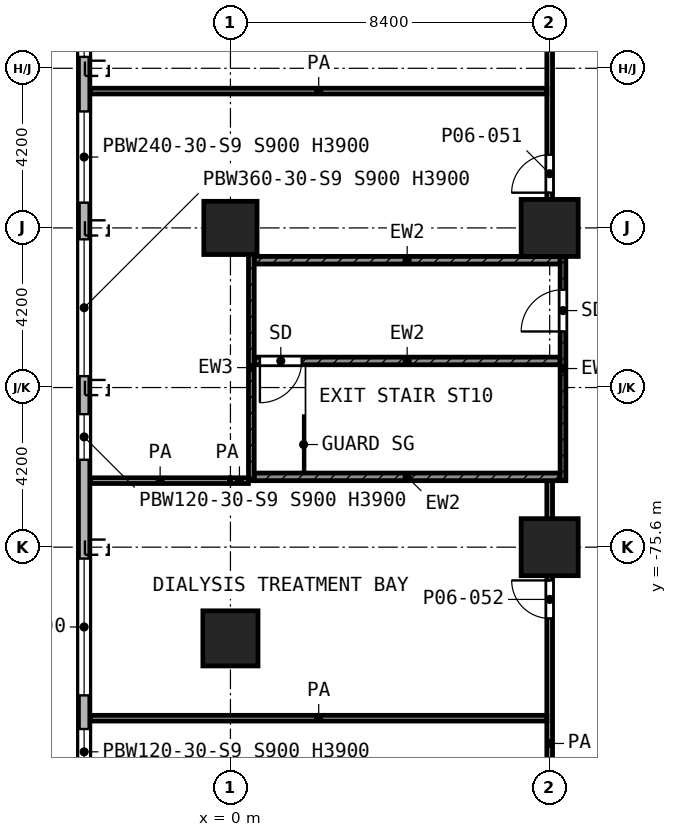
"""IFC4 building model, lengths in metres.
Left out: names, types, materials, properties, quantities, classifications, styles, units other than length and angle.
Written with IfcOpenShell. Run it as: python <this file> out.ifc"""

import sys

from ifc_helpers import new_model, si_unit, direction, frame, frame_2d, origin, origin_2d, place, context, subcontext, project, spatial, rectangle, extrude, element, fill, save


model = new_model("IFC4")
c1 = context("Model", 3, precision=1e-05, world=origin(), true_north=direction((0.0, 1.0)))
c2 = subcontext(c1, "Body", "Model", "MODEL_VIEW")
j1 = project(units=[si_unit("LENGTHUNIT", "METRE"), si_unit("PLANEANGLEUNIT", "RADIAN")], contexts=[c1])
p1 = place(None, origin())
s1 = spatial("IfcSite", under=j1, at=p1, CompositionType="ELEMENT")
p2 = place(p1, origin())
s2 = spatial("IfcBuilding", under=s1, at=p2, CompositionType="ELEMENT")
p3 = place(p2, frame((0.0, 0.0, 29.0)))
s3 = spatial("IfcBuildingStorey", under=s2, at=p3, CompositionType="ELEMENT", Elevation=29.0)
p4 = place(p3, frame((0.0, -67.2, 0.0), z_axis=(0.0, 0.0, 1.0), x_axis=(1.0, 0.0, 0.0)))
e1 = element("IfcColumn", 1, at=p4, inside=s3, PredefinedType="COLUMN", context=c2, shape_type="SweptSolid", body=[
    extrude(rectangle(XDim=1.4, YDim=1.4, at=origin_2d()), origin(), (0.0, 0.0, 1.0), 5.2),
])
for number, where, z_axis, x_axis in (
    (2, (8.4, -67.2, 0.0), (0.0, 0.0, 1.0), (1.0, 0.0, 0.0)),
    (3, (8.4, -75.6, 0.0), (0.0, 0.0, 1.0), (1.0, 0.0, 0.0)),
):
    element("IfcColumn", number, at=place(p3, frame(where, z_axis=z_axis, x_axis=x_axis)), inside=s3, PredefinedType="COLUMN", context=c2, shape_type="SweptSolid", body=[
        extrude(rectangle(XDim=1.5, YDim=1.5, at=origin_2d()), origin(), (0.0, 0.0, 1.0), 5.2),
    ])
p5 = place(p3, frame((0.0, -78.0, 0.0), z_axis=(0.0, 0.0, 1.0), x_axis=(1.0, 0.0, 0.0)))
e4 = element("IfcColumn", 4, at=p5, inside=s3, PredefinedType="COLUMN", context=c2, shape_type="SweptSolid", body=[
    extrude(rectangle(XDim=1.45, YDim=1.45, at=origin_2d()), origin(), (0.0, 0.0, 1.0), 5.2),
])
p6 = place(p3, frame((-3.85, -2.062, 0.0), z_axis=(0.0, 0.0, 1.0), x_axis=(0.0, -1.0, 0.0)))
e5 = element("IfcWall", 5, at=p6, inside=s3, PredefinedType="SOLIDWALL", context=c2, shape_type="SweptSolid", body=[
    extrude(rectangle(XDim=79.876, YDim=0.3, at=frame_2d((39.938, 0.0))), origin(), (0.0, 0.0, 1.0), 4.7),
])
p7 = place(p6, frame((0.438, 0.0, 0.9)))
e6 = element("IfcOpeningElement", 6, at=p7, cuts=e5, PredefinedType="OPENING", context=c2, shape_type="SweptSolid", body=[
    extrude(rectangle(XDim=1.2, YDim=3.0, at=frame_2d((0.6, 1.5))), frame((0.0, 0.16, 0.0), z_axis=(0.0, -1.0, 0.0), x_axis=(1.0, 0.0, 0.0)), (0.0, 0.0, 1.0), 0.32),
])
p8 = place(p6, frame((2.438, 0.0, 0.9)))
e7 = element("IfcOpeningElement", 7, at=p8, cuts=e5, PredefinedType="OPENING", context=c2, shape_type="SweptSolid", body=[
    extrude(rectangle(XDim=3.6, YDim=3.0, at=frame_2d((1.8, 1.5))), frame((0.0, 0.16, 0.0), z_axis=(0.0, -1.0, 0.0), x_axis=(1.0, 0.0, 0.0)), (0.0, 0.0, 1.0), 0.32),
])
p9 = place(p6, frame((6.638, 0.0, 0.9)))
e8 = element("IfcOpeningElement", 8, at=p9, cuts=e5, PredefinedType="OPENING", context=c2, shape_type="SweptSolid", body=[
    extrude(rectangle(XDim=3.6, YDim=3.0, at=frame_2d((1.8, 1.5))), frame((0.0, 0.16, 0.0), z_axis=(0.0, -1.0, 0.0), x_axis=(1.0, 0.0, 0.0)), (0.0, 0.0, 1.0), 0.32),
])
p10 = place(p6, frame((10.838, 0.0, 0.9)))
e9 = element("IfcOpeningElement", 9, at=p10, cuts=e5, PredefinedType="OPENING", context=c2, shape_type="SweptSolid", body=[
    extrude(rectangle(XDim=3.6, YDim=3.0, at=frame_2d((1.8, 1.5))), frame((0.0, 0.16, 0.0), z_axis=(0.0, -1.0, 0.0), x_axis=(1.0, 0.0, 0.0)), (0.0, 0.0, 1.0), 0.32),
])
p11 = place(p6, frame((15.038, 0.0, 0.9)))
e10 = element("IfcOpeningElement", 10, at=p11, cuts=e5, PredefinedType="OPENING", context=c2, shape_type="SweptSolid", body=[
    extrude(rectangle(XDim=3.6, YDim=3.0, at=frame_2d((1.8, 1.5))), frame((0.0, 0.16, 0.0), z_axis=(0.0, -1.0, 0.0), x_axis=(1.0, 0.0, 0.0)), (0.0, 0.0, 1.0), 0.32),
])
p12 = place(p6, frame((19.238, 0.0, 0.9)))
e11 = element("IfcOpeningElement", 11, at=p12, cuts=e5, PredefinedType="OPENING", context=c2, shape_type="SweptSolid", body=[
    extrude(rectangle(XDim=3.6, YDim=3.0, at=frame_2d((1.8, 1.5))), frame((0.0, 0.16, 0.0), z_axis=(0.0, -1.0, 0.0), x_axis=(1.0, 0.0, 0.0)), (0.0, 0.0, 1.0), 0.32),
])
p13 = place(p6, frame((24.323, 0.0, 0.9)))
e12 = element("IfcOpeningElement", 12, at=p13, cuts=e5, PredefinedType="OPENING", context=c2, shape_type="SweptSolid", body=[
    extrude(rectangle(XDim=2.4, YDim=3.0, at=frame_2d((1.2, 1.5))), frame((0.0, 0.16, 0.0), z_axis=(0.0, -1.0, 0.0), x_axis=(1.0, 0.0, 0.0)), (0.0, 0.0, 1.0), 0.32),
])
p14 = place(p6, frame((27.638, 0.0, 0.9)))
e13 = element("IfcOpeningElement", 13, at=p14, cuts=e5, PredefinedType="OPENING", context=c2, shape_type="SweptSolid", body=[
    extrude(rectangle(XDim=3.6, YDim=3.0, at=frame_2d((1.8, 1.5))), frame((0.0, 0.16, 0.0), z_axis=(0.0, -1.0, 0.0), x_axis=(1.0, 0.0, 0.0)), (0.0, 0.0, 1.0), 0.32),
])
p15 = place(p6, frame((32.823, 0.0, 0.9)))
e14 = element("IfcOpeningElement", 14, at=p15, cuts=e5, PredefinedType="OPENING", context=c2, shape_type="SweptSolid", body=[
    extrude(rectangle(XDim=2.4, YDim=3.0, at=frame_2d((1.2, 1.5))), frame((0.0, 0.16, 0.0), z_axis=(0.0, -1.0, 0.0), x_axis=(1.0, 0.0, 0.0)), (0.0, 0.0, 1.0), 0.32),
])
p16 = place(p6, frame((36.038, 0.0, 0.9)))
e15 = element("IfcOpeningElement", 15, at=p16, cuts=e5, PredefinedType="OPENING", context=c2, shape_type="SweptSolid", body=[
    extrude(rectangle(XDim=3.6, YDim=3.0, at=frame_2d((1.8, 1.5))), frame((0.0, 0.16, 0.0), z_axis=(0.0, -1.0, 0.0), x_axis=(1.0, 0.0, 0.0)), (0.0, 0.0, 1.0), 0.32),
])
p17 = place(p6, frame((40.603, 0.0, 0.9)))
e16 = element("IfcOpeningElement", 16, at=p17, cuts=e5, PredefinedType="OPENING", context=c2, shape_type="SweptSolid", body=[
    extrude(rectangle(XDim=2.4, YDim=3.0, at=frame_2d((1.2, 1.5))), frame((0.0, 0.16, 0.0), z_axis=(0.0, -1.0, 0.0), x_axis=(1.0, 0.0, 0.0)), (0.0, 0.0, 1.0), 0.32),
])
p18 = place(p6, frame((44.438, 0.0, 0.9)))
e17 = element("IfcOpeningElement", 17, at=p18, cuts=e5, PredefinedType="OPENING", context=c2, shape_type="SweptSolid", body=[
    extrude(rectangle(XDim=3.6, YDim=3.0, at=frame_2d((1.8, 1.5))), frame((0.0, 0.16, 0.0), z_axis=(0.0, -1.0, 0.0), x_axis=(1.0, 0.0, 0.0)), (0.0, 0.0, 1.0), 0.32),
])
p19 = place(p6, frame((48.638, 0.0, 0.9)))
e18 = element("IfcOpeningElement", 18, at=p19, cuts=e5, PredefinedType="OPENING", context=c2, shape_type="SweptSolid", body=[
    extrude(rectangle(XDim=3.6, YDim=3.0, at=frame_2d((1.8, 1.5))), frame((0.0, 0.16, 0.0), z_axis=(0.0, -1.0, 0.0), x_axis=(1.0, 0.0, 0.0)), (0.0, 0.0, 1.0), 0.32),
])
p20 = place(p6, frame((52.838, 0.0, 0.9)))
e19 = element("IfcOpeningElement", 19, at=p20, cuts=e5, PredefinedType="OPENING", context=c2, shape_type="SweptSolid", body=[
    extrude(rectangle(XDim=3.6, YDim=3.0, at=frame_2d((1.8, 1.5))), frame((0.0, 0.16, 0.0), z_axis=(0.0, -1.0, 0.0), x_axis=(1.0, 0.0, 0.0)), (0.0, 0.0, 1.0), 0.32),
])
p21 = place(p6, frame((57.038, 0.0, 0.9)))
e20 = element("IfcOpeningElement", 20, at=p21, cuts=e5, PredefinedType="OPENING", context=c2, shape_type="SweptSolid", body=[
    extrude(rectangle(XDim=3.6, YDim=3.0, at=frame_2d((1.8, 1.5))), frame((0.0, 0.16, 0.0), z_axis=(0.0, -1.0, 0.0), x_axis=(1.0, 0.0, 0.0)), (0.0, 0.0, 1.0), 0.32),
])
p22 = place(p6, frame((62.073, 0.0, 0.9)))
e21 = element("IfcOpeningElement", 21, at=p22, cuts=e5, PredefinedType="OPENING", context=c2, shape_type="SweptSolid", body=[
    extrude(rectangle(XDim=2.4, YDim=3.0, at=frame_2d((1.2, 1.5))), frame((0.0, 0.16, 0.0), z_axis=(0.0, -1.0, 0.0), x_axis=(1.0, 0.0, 0.0)), (0.0, 0.0, 1.0), 0.32),
])
p23 = place(p6, frame((65.438, 0.0, 0.9)))
e22 = element("IfcOpeningElement", 22, at=p23, cuts=e5, PredefinedType="OPENING", context=c2, shape_type="SweptSolid", body=[
    extrude(rectangle(XDim=3.6, YDim=3.0, at=frame_2d((1.8, 1.5))), frame((0.0, 0.16, 0.0), z_axis=(0.0, -1.0, 0.0), x_axis=(1.0, 0.0, 0.0)), (0.0, 0.0, 1.0), 0.32),
])
p24 = place(p6, frame((70.038, 0.0, 0.9)))
e23 = element("IfcOpeningElement", 23, at=p24, cuts=e5, PredefinedType="OPENING", context=c2, shape_type="SweptSolid", body=[
    extrude(rectangle(XDim=1.2, YDim=3.0, at=frame_2d((0.6, 1.5))), frame((0.0, 0.16, 0.0), z_axis=(0.0, -1.0, 0.0), x_axis=(1.0, 0.0, 0.0)), (0.0, 0.0, 1.0), 0.32),
])
p25 = place(p6, frame((73.838, 0.0, 0.9)))
e24 = element("IfcOpeningElement", 24, at=p25, cuts=e5, PredefinedType="OPENING", context=c2, shape_type="SweptSolid", body=[
    extrude(rectangle(XDim=3.6, YDim=3.0, at=frame_2d((1.8, 1.5))), frame((0.0, 0.16, 0.0), z_axis=(0.0, -1.0, 0.0), x_axis=(1.0, 0.0, 0.0)), (0.0, 0.0, 1.0), 0.32),
])
p26 = place(p6, frame((78.323, 0.0, 0.9)))
e25 = element("IfcOpeningElement", 25, at=p26, cuts=e5, PredefinedType="OPENING", context=c2, shape_type="SweptSolid", body=[
    extrude(rectangle(XDim=1.2, YDim=3.0, at=frame_2d((0.6, 1.5))), frame((0.0, 0.16, 0.0), z_axis=(0.0, -1.0, 0.0), x_axis=(1.0, 0.0, 0.0)), (0.0, 0.0, 1.0), 0.32),
])
p27 = place(p3, frame((0.55, -73.85, 0.0), z_axis=(0.0, 0.0, 1.0), x_axis=(0.0, 1.0, 0.0)))
e26 = element("IfcWall", 26, at=p27, inside=s3, PredefinedType="SHEAR", context=c2, shape_type="SweptSolid", body=[
    extrude(rectangle(XDim=5.95, YDim=0.15, at=frame_2d((2.975, 0.0))), origin(), (0.0, 0.0, 1.0), 4.7),
])
p28 = place(p3, frame((8.75, -73.85, 0.0), z_axis=(0.0, 0.0, 1.0), x_axis=(0.0, 1.0, 0.0)))
e27 = element("IfcWall", 27, at=p28, inside=s3, PredefinedType="SHEAR", context=c2, shape_type="SweptSolid", body=[
    extrude(rectangle(XDim=5.9, YDim=0.15, at=frame_2d((2.95, 0.0))), origin(), (0.0, 0.0, 1.0), 4.7),
])
p29 = place(p28, frame((3.925, 0.0, 0.0)))
e28 = element("IfcOpeningElement", 28, at=p29, cuts=e27, PredefinedType="OPENING", context=c2, shape_type="SweptSolid", body=[
    extrude(rectangle(XDim=1.1, YDim=2.1, at=frame_2d((0.55, 1.05))), frame((0.0, 0.085, 0.0), z_axis=(0.0, -1.0, 0.0), x_axis=(1.0, 0.0, 0.0)), (0.0, 0.0, 1.0), 0.17),
])
p30 = place(p3, frame((0.625, -73.75, 0.0), z_axis=(0.0, 0.0, 1.0), x_axis=(1.0, 0.0, 0.0)))
e29 = element("IfcWall", 29, at=p30, inside=s3, PredefinedType="SHEAR", context=c2, shape_type="SweptSolid", body=[
    extrude(rectangle(XDim=8.05, YDim=0.2, at=frame_2d((4.025, 0.0))), origin(), (0.0, 0.0, 1.0), 4.7),
])
p31 = place(p3, frame((0.625, -70.7, 0.0), z_axis=(0.0, 0.0, 1.0), x_axis=(1.0, 0.0, 0.0)))
e30 = element("IfcWall", 30, at=p31, inside=s3, PredefinedType="SHEAR", context=c2, shape_type="SweptSolid", body=[
    extrude(rectangle(XDim=8.05, YDim=0.2, at=frame_2d((4.025, 0.0))), origin(), (0.0, 0.0, 1.0), 4.7),
])
p32 = place(p31, frame((0.15, 0.0, 0.0)))
e31 = element("IfcOpeningElement", 31, at=p32, cuts=e30, PredefinedType="OPENING", context=c2, shape_type="SweptSolid", body=[
    extrude(rectangle(XDim=1.1, YDim=2.1, at=frame_2d((0.55, 1.05))), frame((0.0, 0.11, 0.0), z_axis=(0.0, -1.0, 0.0), x_axis=(1.0, 0.0, 0.0)), (0.0, 0.0, 1.0), 0.22),
])
p33 = place(p3, frame((0.625, -68.05, 0.0), z_axis=(0.0, 0.0, 1.0), x_axis=(1.0, 0.0, 0.0)))
e32 = element("IfcWall", 32, at=p33, inside=s3, PredefinedType="SHEAR", context=c2, shape_type="SweptSolid", body=[
    extrude(rectangle(XDim=8.05, YDim=0.2, at=frame_2d((4.025, 0.0))), origin(), (0.0, 0.0, 1.0), 4.7),
])
p34 = place(p3, frame((-3.68, -80.1, 0.0), z_axis=(0.0, 0.0, 1.0), x_axis=(1.0, 0.0, 0.0)))
e33 = element("IfcWall", 33, at=p34, inside=s3, PredefinedType="PARTITIONING", context=c2, shape_type="SweptSolid", body=[
    extrude(rectangle(XDim=12.005, YDim=0.15, at=frame_2d((6.002, 0.0))), origin(), (0.0, 0.0, 1.0), 4.7),
])
p35 = place(p3, frame((-3.68, -73.85, 0.0), z_axis=(0.0, 0.0, 1.0), x_axis=(1.0, 0.0, 0.0)))
e34 = element("IfcWall", 34, at=p35, inside=s3, PredefinedType="PARTITIONING", context=c2, shape_type="SweptSolid", body=[
    extrude(rectangle(XDim=3.66, YDim=0.15, at=frame_2d((1.83, 0.0))), origin(), (0.0, 0.0, 1.0), 4.7),
])
p36 = place(p3, frame((0.0, -73.85, 0.0), z_axis=(0.0, 0.0, 1.0), x_axis=(1.0, 0.0, 0.0)))
e35 = element("IfcWall", 35, at=p36, inside=s3, PredefinedType="PARTITIONING", context=c2, shape_type="SweptSolid", body=[
    extrude(rectangle(XDim=0.473, YDim=0.15, at=frame_2d((0.236, 0.0))), origin(), (0.0, 0.0, 1.0), 4.7),
])
p37 = place(p3, frame((-3.68, -63.6, 0.0), z_axis=(0.0, 0.0, 1.0), x_axis=(1.0, 0.0, 0.0)))
e36 = element("IfcWall", 36, at=p37, inside=s3, PredefinedType="PARTITIONING", context=c2, shape_type="SweptSolid", body=[
    extrude(rectangle(XDim=12.005, YDim=0.15, at=frame_2d((6.002, 0.0))), origin(), (0.0, 0.0, 1.0), 4.7),
])
p38 = place(p3, frame((8.4, -87.68, 0.0), z_axis=(0.0, 0.0, 1.0), x_axis=(0.0, 1.0, 0.0)))
e37 = element("IfcWall", 37, at=p38, inside=s3, PredefinedType="PARTITIONING", context=c2, shape_type="SweptSolid", body=[
    extrude(rectangle(XDim=13.83, YDim=0.15, at=frame_2d((6.915, 0.0))), origin(), (0.0, 0.0, 1.0), 4.7),
])
p39 = place(p38, frame((10.205, 0.0, 0.0)))
e38 = element("IfcOpeningElement", 38, at=p39, cuts=e37, PredefinedType="OPENING", context=c2, shape_type="SweptSolid", body=[
    extrude(rectangle(XDim=1.0, YDim=2.1, at=frame_2d((0.5, 1.05))), frame((0.0, 0.085, 0.0), z_axis=(0.0, -1.0, 0.0), x_axis=(1.0, 0.0, 0.0)), (0.0, 0.0, 1.0), 0.17),
])
p40 = place(p38, frame((3.13, 0.0, 0.0)))
e39 = element("IfcOpeningElement", 39, at=p40, cuts=e37, PredefinedType="OPENING", context=c2, shape_type="SweptSolid", body=[
    extrude(rectangle(XDim=1.0, YDim=2.1, at=frame_2d((0.5, 1.05))), frame((0.0, 0.085, 0.0), z_axis=(0.0, -1.0, 0.0), x_axis=(1.0, 0.0, 0.0)), (0.0, 0.0, 1.0), 0.17),
])
p41 = place(p3, frame((8.4, -67.947, 0.0), z_axis=(0.0, 0.0, 1.0), x_axis=(0.0, 1.0, 0.0)))
e40 = element("IfcWall", 40, at=p41, inside=s3, PredefinedType="PARTITIONING", context=c2, shape_type="SweptSolid", body=[
    extrude(rectangle(XDim=25.597, YDim=0.15, at=frame_2d((12.798, 0.0))), origin(), (0.0, 0.0, 1.0), 4.7),
])
p42 = place(p41, frame((19.447, 0.0, 0.0)))
e41 = element("IfcOpeningElement", 41, at=p42, cuts=e40, PredefinedType="OPENING", context=c2, shape_type="SweptSolid", body=[
    extrude(rectangle(XDim=1.0, YDim=2.1, at=frame_2d((0.5, 1.05))), frame((0.0, 0.085, 0.0), z_axis=(0.0, -1.0, 0.0), x_axis=(1.0, 0.0, 0.0)), (0.0, 0.0, 1.0), 0.17),
])
p43 = place(p41, frame((14.947, 0.0, 0.0)))
e42 = element("IfcOpeningElement", 42, at=p43, cuts=e40, PredefinedType="OPENING", context=c2, shape_type="SweptSolid", body=[
    extrude(rectangle(XDim=1.0, YDim=2.1, at=frame_2d((0.5, 1.05))), frame((0.0, 0.085, 0.0), z_axis=(0.0, -1.0, 0.0), x_axis=(1.0, 0.0, 0.0)), (0.0, 0.0, 1.0), 0.17),
])
p44 = place(p41, frame((10.747, 0.0, 0.0)))
e43 = element("IfcOpeningElement", 43, at=p44, cuts=e40, PredefinedType="OPENING", context=c2, shape_type="SweptSolid", body=[
    extrude(rectangle(XDim=1.0, YDim=2.1, at=frame_2d((0.5, 1.05))), frame((0.0, 0.085, 0.0), z_axis=(0.0, -1.0, 0.0), x_axis=(1.0, 0.0, 0.0)), (0.0, 0.0, 1.0), 0.17),
])
p45 = place(p41, frame((6.247, 0.0, 0.0)))
e44 = element("IfcOpeningElement", 44, at=p45, cuts=e40, PredefinedType="OPENING", context=c2, shape_type="SweptSolid", body=[
    extrude(rectangle(XDim=1.0, YDim=2.1, at=frame_2d((0.5, 1.05))), frame((0.0, 0.085, 0.0), z_axis=(0.0, -1.0, 0.0), x_axis=(1.0, 0.0, 0.0)), (0.0, 0.0, 1.0), 0.17),
])
p46 = place(p41, frame((1.674, 0.0, 0.0)))
e45 = element("IfcOpeningElement", 45, at=p46, cuts=e40, PredefinedType="OPENING", context=c2, shape_type="SweptSolid", body=[
    extrude(rectangle(XDim=1.0, YDim=2.1, at=frame_2d((0.5, 1.05))), frame((0.0, 0.085, 0.0), z_axis=(0.0, -1.0, 0.0), x_axis=(1.0, 0.0, 0.0)), (0.0, 0.0, 1.0), 0.17),
])
p47 = place(p21, origin())
e46 = element("IfcWindow", 46, at=p47, inside=s3, PartitioningType="SINGLE_PANEL", PredefinedType="WINDOW", context=c2, shape_type="SweptSolid", body=[
    extrude(rectangle(XDim=3.6, YDim=3.0, at=frame_2d((1.8, 1.5))), frame((0.0, 0.03, 0.0), z_axis=(0.0, -1.0, 0.0), x_axis=(1.0, 0.0, 0.0)), (0.0, 0.0, 1.0), 0.06),
])
fill(e20, e46)
p48 = place(p22, origin())
e47 = element("IfcWindow", 47, at=p48, inside=s3, PartitioningType="SINGLE_PANEL", PredefinedType="WINDOW", context=c2, shape_type="SweptSolid", body=[
    extrude(rectangle(XDim=2.4, YDim=3.0, at=frame_2d((1.2, 1.5))), frame((0.0, 0.03, 0.0), z_axis=(0.0, -1.0, 0.0), x_axis=(1.0, 0.0, 0.0)), (0.0, 0.0, 1.0), 0.06),
])
fill(e21, e47)
p49 = place(p23, origin())
e48 = element("IfcWindow", 48, at=p49, inside=s3, PartitioningType="SINGLE_PANEL", PredefinedType="WINDOW", context=c2, shape_type="SweptSolid", body=[
    extrude(rectangle(XDim=3.6, YDim=3.0, at=frame_2d((1.8, 1.5))), frame((0.0, 0.03, 0.0), z_axis=(0.0, -1.0, 0.0), x_axis=(1.0, 0.0, 0.0)), (0.0, 0.0, 1.0), 0.06),
])
fill(e22, e48)
p50 = place(p24, origin())
e49 = element("IfcWindow", 49, at=p50, inside=s3, PartitioningType="SINGLE_PANEL", PredefinedType="WINDOW", context=c2, shape_type="SweptSolid", body=[
    extrude(rectangle(XDim=1.2, YDim=3.0, at=frame_2d((0.6, 1.5))), frame((0.0, 0.03, 0.0), z_axis=(0.0, -1.0, 0.0), x_axis=(1.0, 0.0, 0.0)), (0.0, 0.0, 1.0), 0.06),
])
fill(e23, e49)
p51 = place(p25, origin())
e50 = element("IfcWindow", 50, at=p51, inside=s3, PartitioningType="SINGLE_PANEL", PredefinedType="WINDOW", context=c2, shape_type="SweptSolid", body=[
    extrude(rectangle(XDim=3.6, YDim=3.0, at=frame_2d((1.8, 1.5))), frame((0.0, 0.03, 0.0), z_axis=(0.0, -1.0, 0.0), x_axis=(1.0, 0.0, 0.0)), (0.0, 0.0, 1.0), 0.06),
])
fill(e24, e50)
p52 = place(p26, origin())
e51 = element("IfcWindow", 51, at=p52, inside=s3, PartitioningType="SINGLE_PANEL", PredefinedType="WINDOW", context=c2, shape_type="SweptSolid", body=[
    extrude(rectangle(XDim=1.2, YDim=3.0, at=frame_2d((0.6, 1.5))), frame((0.0, 0.03, 0.0), z_axis=(0.0, -1.0, 0.0), x_axis=(1.0, 0.0, 0.0)), (0.0, 0.0, 1.0), 0.06),
])
fill(e25, e51)
p53 = place(p32, frame((1.1, 0.0, 0.0), z_axis=(0.0, 0.0, 1.0), x_axis=(-1.0, 0.0, 0.0)))
e52 = element("IfcDoor", 52, at=p53, inside=s3, OperationType="SINGLE_SWING_LEFT", PredefinedType="DOOR", context=c2, shape_type="SweptSolid", body=[
    extrude(rectangle(XDim=1.1, YDim=2.1, at=frame_2d((0.55, 1.05))), frame((0.0, 0.025, 0.0), z_axis=(0.0, -1.0, 0.0), x_axis=(1.0, 0.0, 0.0)), (0.0, 0.0, 1.0), 0.05),
])
fill(e31, e52)
p54 = place(p29, origin())
e53 = element("IfcDoor", 53, at=p54, inside=s3, OperationType="SINGLE_SWING_LEFT", PredefinedType="DOOR", context=c2, shape_type="SweptSolid", body=[
    extrude(rectangle(XDim=1.1, YDim=2.1, at=frame_2d((0.55, 1.05))), frame((0.0, 0.025, 0.0), z_axis=(0.0, -1.0, 0.0), x_axis=(1.0, 0.0, 0.0)), (0.0, 0.0, 1.0), 0.05),
])
fill(e28, e53)
p55 = place(p46, origin())
e54 = element("IfcDoor", 54, at=p55, inside=s3, OperationType="SINGLE_SWING_LEFT", PredefinedType="DOOR", context=c2, shape_type="SweptSolid", body=[
    extrude(rectangle(XDim=1.0, YDim=2.1, at=frame_2d((0.5, 1.05))), frame((0.0, 0.025, 0.0), z_axis=(0.0, -1.0, 0.0), x_axis=(1.0, 0.0, 0.0)), (0.0, 0.0, 1.0), 0.05),
])
fill(e45, e54)
p56 = place(p39, origin())
e55 = element("IfcDoor", 55, at=p56, inside=s3, OperationType="SINGLE_SWING_RIGHT", PredefinedType="DOOR", context=c2, shape_type="SweptSolid", body=[
    extrude(rectangle(XDim=1.0, YDim=2.1, at=frame_2d((0.5, 1.05))), frame((0.0, 0.025, 0.0), z_axis=(0.0, -1.0, 0.0), x_axis=(1.0, 0.0, 0.0)), (0.0, 0.0, 1.0), 0.05),
])
fill(e38, e55)
save(model, sys.argv[1])
